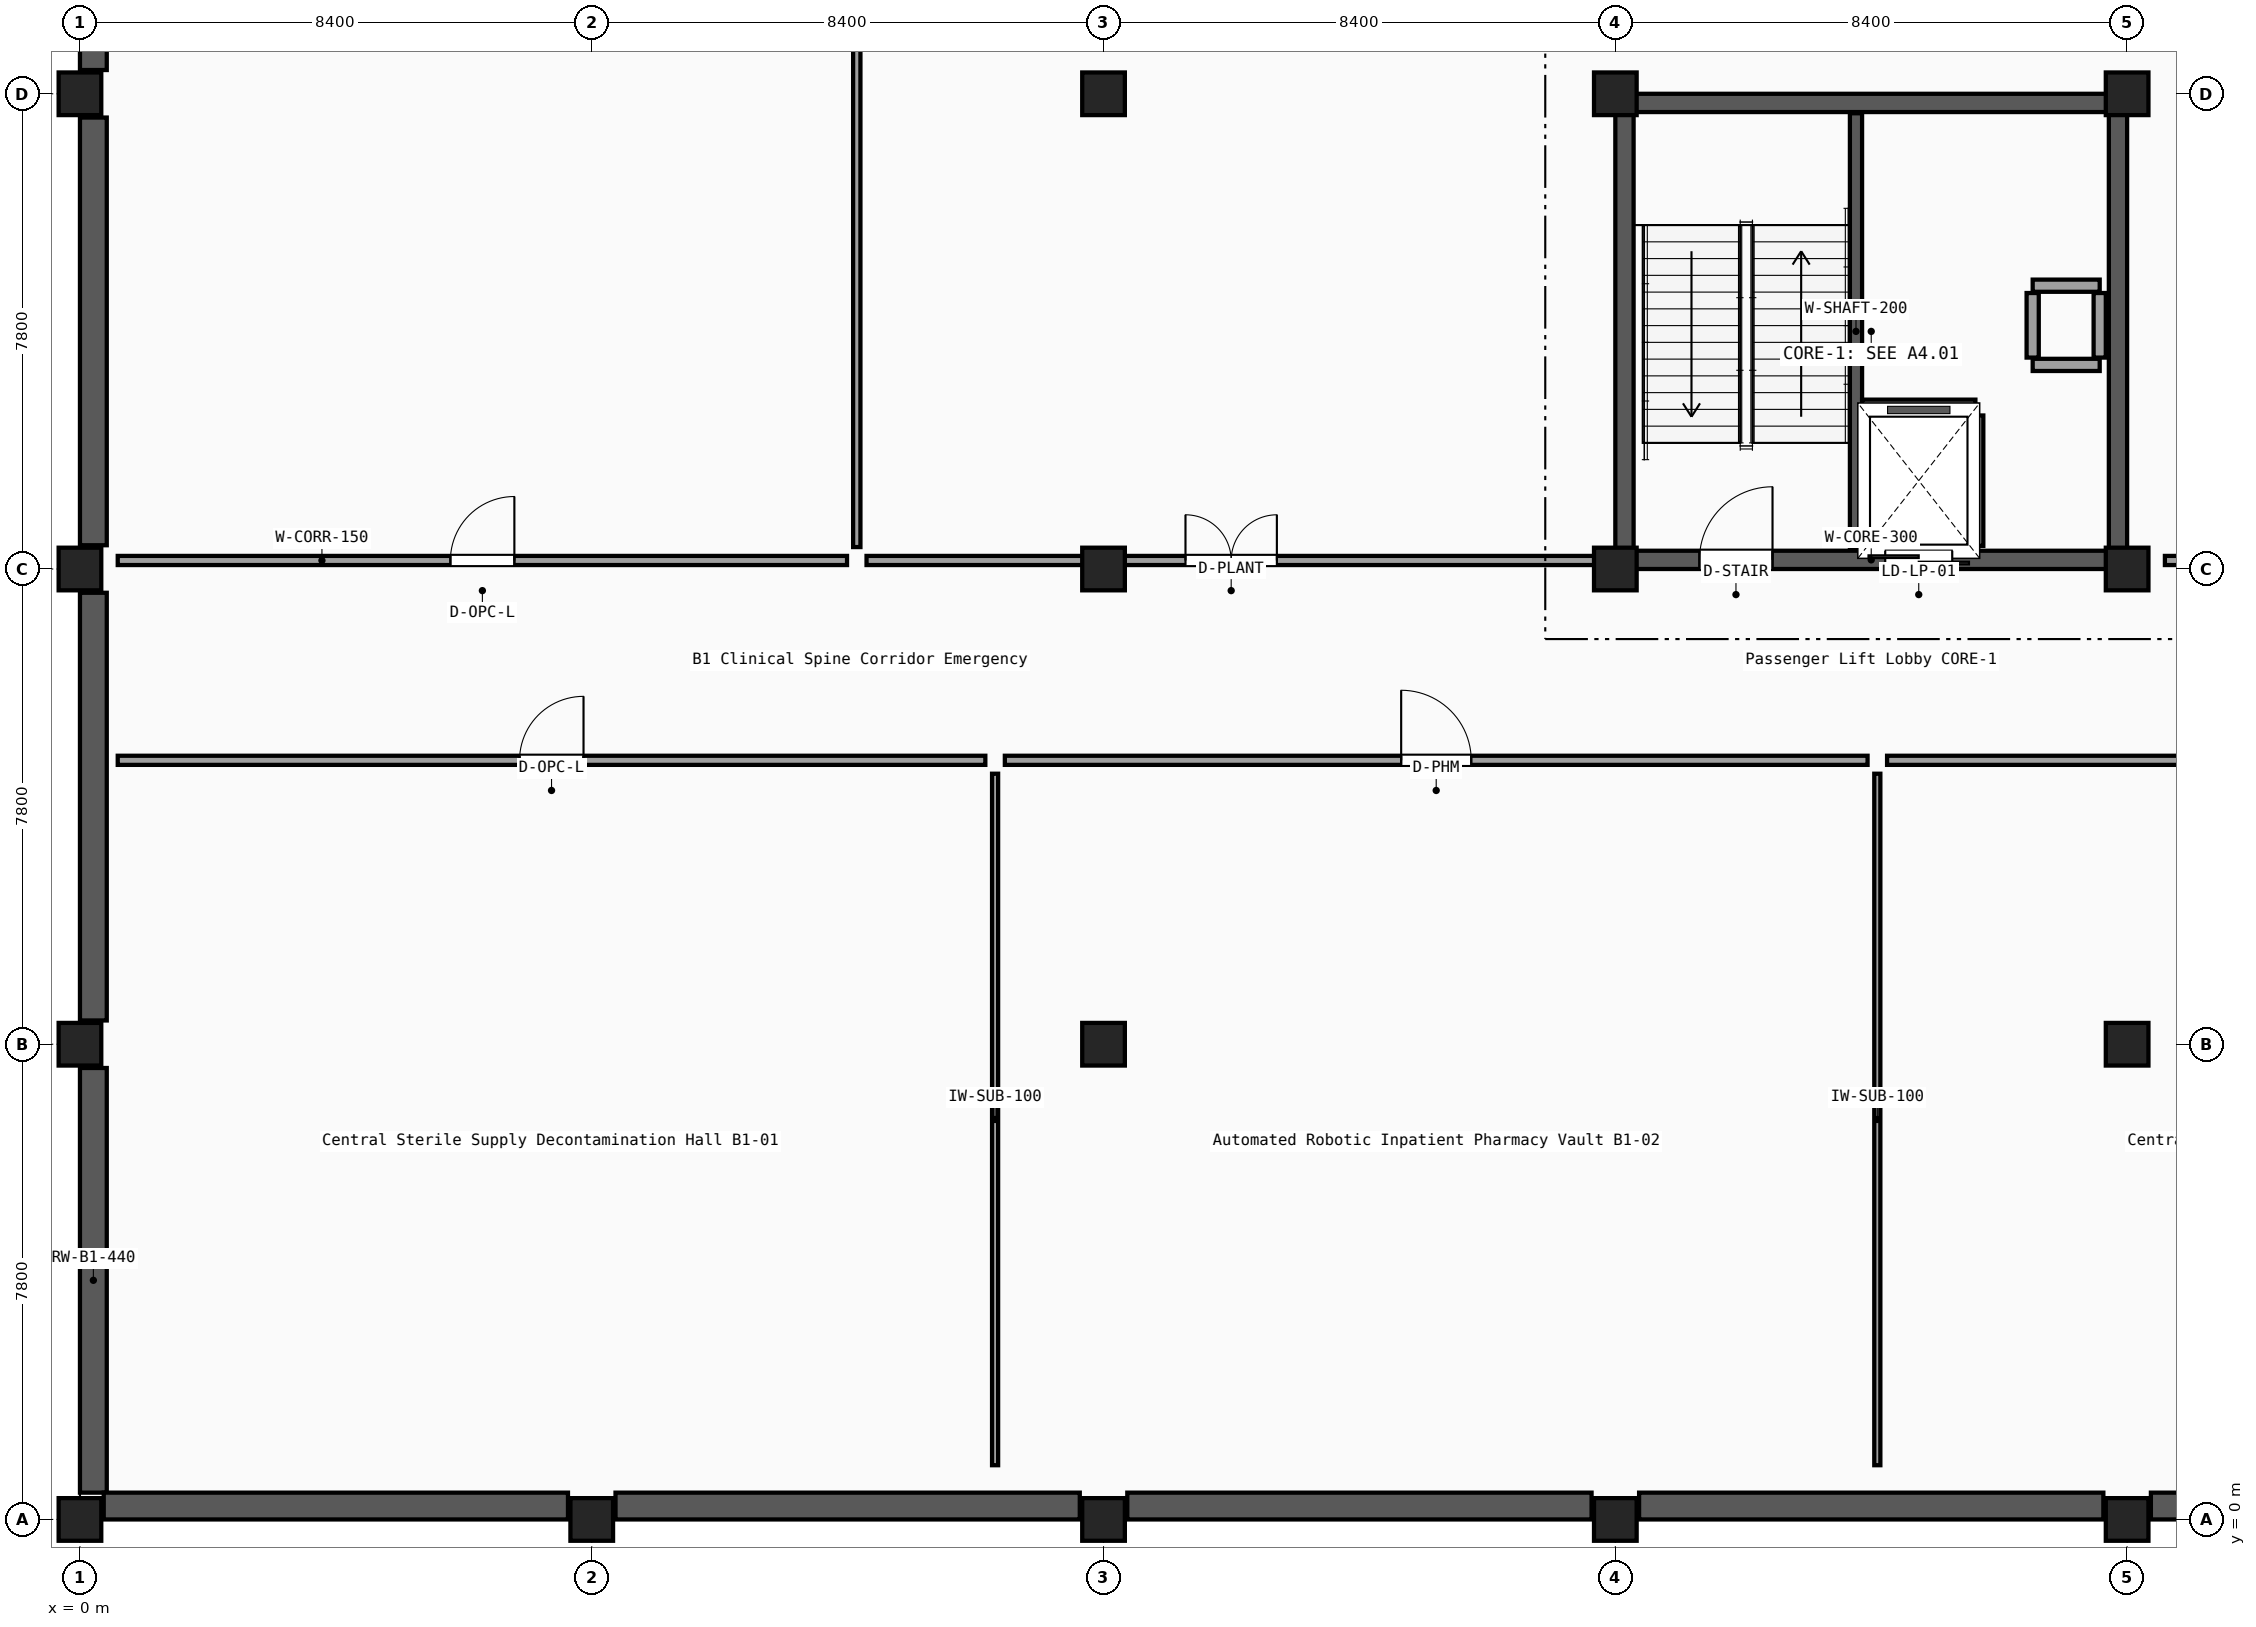
"""IFC4 building model, lengths in metres.
Left out: names, types, materials, properties, quantities, classifications, styles, units other than length and angle.
Written with IfcOpenShell. Run it as: python <this file> out.ifc"""

import sys

from ifc_helpers import new_model, si_unit, direction, frame, frame_2d, origin, origin_2d, place, context, subcontext, project, spatial, rectangle, extrude, element, fill, save


model = new_model("IFC4")
c1 = context("Model", 3, precision=1e-05, world=origin(), true_north=direction((0.0, 1.0)))
c2 = subcontext(c1, "Body", "Model", "MODEL_VIEW")
j1 = project(units=[si_unit("LENGTHUNIT", "METRE"), si_unit("PLANEANGLEUNIT", "RADIAN")], contexts=[c1])
p1 = place(None, origin())
s1 = spatial("IfcSite", under=j1, at=p1, CompositionType="ELEMENT")
p2 = place(p1, origin())
s2 = spatial("IfcBuilding", under=s1, at=p2, CompositionType="ELEMENT")
p3 = place(p2, frame((0.0, 0.0, -5.1)))
s3 = spatial("IfcBuildingStorey", under=s2, at=p3, CompositionType="ELEMENT", Elevation=-5.1)
for number, where, z_axis, x_axis in (
    (1, (0.0, 0.0, -0.22), (0.0, 0.0, 1.0), (1.0, 0.0, 0.0)),
    (2, (0.0, 7.8, -0.22), (0.0, 0.0, 1.0), (1.0, 0.0, 0.0)),
    (3, (0.0, 15.6, -0.22), (0.0, 0.0, 1.0), (1.0, 0.0, 0.0)),
    (4, (0.0, 23.4, -0.22), (0.0, 0.0, 1.0), (1.0, 0.0, 0.0)),
    (5, (8.4, 0.0, -0.22), (0.0, 0.0, 1.0), (1.0, 0.0, 0.0)),
    (6, (16.8, 0.0, -0.22), (0.0, 0.0, 1.0), (1.0, 0.0, 0.0)),
    (7, (16.8, 7.8, -0.22), (0.0, 0.0, 1.0), (1.0, 0.0, 0.0)),
    (8, (16.8, 15.6, -0.22), (0.0, 0.0, 1.0), (1.0, 0.0, 0.0)),
    (9, (16.8, 23.4, -0.22), (0.0, 0.0, 1.0), (1.0, 0.0, 0.0)),
    (10, (25.2, 0.0, -0.22), (0.0, 0.0, 1.0), (1.0, 0.0, 0.0)),
    (11, (25.2, 15.6, -0.22), (0.0, 0.0, 1.0), (1.0, 0.0, 0.0)),
    (12, (25.2, 23.4, -0.22), (0.0, 0.0, 1.0), (1.0, 0.0, 0.0)),
    (13, (33.6, 0.0, -0.22), (0.0, 0.0, 1.0), (1.0, 0.0, 0.0)),
    (14, (33.6, 7.8, -0.22), (0.0, 0.0, 1.0), (1.0, 0.0, 0.0)),
    (15, (33.6, 15.6, -0.22), (0.0, 0.0, 1.0), (1.0, 0.0, 0.0)),
    (16, (33.6, 23.4, -0.22), (0.0, 0.0, 1.0), (1.0, 0.0, 0.0)),
):
    element("IfcColumn", number, at=place(p3, frame(where, z_axis=z_axis, x_axis=x_axis)), inside=s3, PredefinedType="COLUMN", context=c2, shape_type="SweptSolid", body=[
        extrude(rectangle(XDim=0.7, YDim=0.7, at=origin_2d()), origin(), (0.0, 0.0, 1.0), 5.32),
    ])
p4 = place(p3, frame((0.22, 0.44, 0.0), z_axis=(0.0, 0.0, 1.0), x_axis=(0.0, 1.0, 0.0)))
e17 = element("IfcWall", 17, at=p4, inside=s3, PredefinedType="USERDEFINED", context=c2, shape_type="SweptSolid", body=[
    extrude(rectangle(XDim=6.97, YDim=0.44, at=frame_2d((3.485, 0.0))), origin(), (0.0, 0.0, 1.0), 4.33),
])
for number, where, z_axis, x_axis in (
    (18, (0.22, 8.19, 0.0), (0.0, 0.0, 1.0), (0.0, 1.0, 0.0)),
    (19, (0.22, 15.99, 0.0), (0.0, 0.0, 1.0), (0.0, 1.0, 0.0)),
):
    element("IfcWall", number, at=place(p3, frame(where, z_axis=z_axis, x_axis=x_axis)), inside=s3, PredefinedType="USERDEFINED", context=c2, shape_type="SweptSolid", body=[
        extrude(rectangle(XDim=7.02, YDim=0.44, at=frame_2d((3.51, 0.0))), origin(), (0.0, 0.0, 1.0), 4.23),
    ])
p5 = place(p3, frame((0.22, 23.79, 0.0), z_axis=(0.0, 0.0, 1.0), x_axis=(0.0, 1.0, 0.0)))
e20 = element("IfcWall", 20, at=p5, inside=s3, PredefinedType="USERDEFINED", context=c2, shape_type="SweptSolid", body=[
    extrude(rectangle(XDim=7.02, YDim=0.44, at=frame_2d((3.51, 0.0))), origin(), (0.0, 0.0, 1.0), 4.33),
])
p6 = place(p3, frame((0.39, 0.22, 0.0), z_axis=(0.0, 0.0, 1.0), x_axis=(1.0, 0.0, 0.0)))
e21 = element("IfcWall", 21, at=p6, inside=s3, PredefinedType="USERDEFINED", context=c2, shape_type="SweptSolid", body=[
    extrude(rectangle(XDim=7.62, YDim=0.44, at=frame_2d((3.81, 0.0))), origin(), (0.0, 0.0, 1.0), 4.44),
])
p7 = place(p3, frame((8.79, 0.22, 0.0), z_axis=(0.0, 0.0, 1.0), x_axis=(1.0, 0.0, 0.0)))
e22 = element("IfcWall", 22, at=p7, inside=s3, PredefinedType="USERDEFINED", context=c2, shape_type="SweptSolid", body=[
    extrude(rectangle(XDim=7.62, YDim=0.44, at=frame_2d((3.81, 0.0))), origin(), (0.0, 0.0, 1.0), 4.43),
])
p8 = place(p3, frame((17.19, 0.22, 0.0), z_axis=(0.0, 0.0, 1.0), x_axis=(1.0, 0.0, 0.0)))
e23 = element("IfcWall", 23, at=p8, inside=s3, PredefinedType="USERDEFINED", context=c2, shape_type="SweptSolid", body=[
    extrude(rectangle(XDim=7.62, YDim=0.44, at=frame_2d((3.81, 0.0))), origin(), (0.0, 0.0, 1.0), 4.43),
])
p9 = place(p3, frame((25.59, 0.22, 0.0), z_axis=(0.0, 0.0, 1.0), x_axis=(1.0, 0.0, 0.0)))
e24 = element("IfcWall", 24, at=p9, inside=s3, PredefinedType="USERDEFINED", context=c2, shape_type="SweptSolid", body=[
    extrude(rectangle(XDim=7.62, YDim=0.44, at=frame_2d((3.81, 0.0))), origin(), (0.0, 0.0, 1.0), 4.43),
])
p10 = place(p3, frame((33.99, 0.22, 0.0), z_axis=(0.0, 0.0, 1.0), x_axis=(1.0, 0.0, 0.0)))
e25 = element("IfcWall", 25, at=p10, inside=s3, PredefinedType="USERDEFINED", context=c2, shape_type="SweptSolid", body=[
    extrude(rectangle(XDim=7.62, YDim=0.44, at=frame_2d((3.81, 0.0))), origin(), (0.0, 0.0, 1.0), 4.43),
])
p11 = place(p3, frame((25.2, 15.75, -0.22), z_axis=(0.0, 0.0, 1.0), x_axis=(1.0, 0.0, 0.0)))
e26 = element("IfcWall", 26, at=p11, inside=s3, PredefinedType="SHEAR", context=c2, shape_type="SweptSolid", body=[
    extrude(rectangle(XDim=8.4, YDim=0.3, at=frame_2d((4.2, 0.0))), origin(), (0.0, 0.0, 1.0), 5.07),
])
p12 = place(p11, frame((1.38, 0.0, 0.22)))
e27 = element("IfcOpeningElement", 27, at=p12, cuts=e26, PredefinedType="OPENING", context=c2, shape_type="SweptSolid", body=[
    extrude(rectangle(XDim=1.2, YDim=2.15, at=frame_2d((0.6, 1.075))), frame((0.0, 0.16, 0.0), z_axis=(0.0, -1.0, 0.0), x_axis=(1.0, 0.0, 0.0)), (0.0, 0.0, 1.0), 0.32),
])
p13 = place(p11, frame((4.43, 0.0, 0.22)))
e28 = element("IfcOpeningElement", 28, at=p13, cuts=e26, PredefinedType="OPENING", context=c2, shape_type="SweptSolid", body=[
    extrude(rectangle(XDim=1.1, YDim=2.15, at=frame_2d((0.55, 1.075))), frame((0.0, 0.16, 0.0), z_axis=(0.0, -1.0, 0.0), x_axis=(1.0, 0.0, 0.0)), (0.0, 0.0, 1.0), 0.32),
])
p14 = place(p3, frame((25.2, 23.25, -0.22), z_axis=(0.0, 0.0, 1.0), x_axis=(1.0, 0.0, 0.0)))
e29 = element("IfcWall", 29, at=p14, inside=s3, PredefinedType="SHEAR", context=c2, shape_type="SweptSolid", body=[
    extrude(rectangle(XDim=8.4, YDim=0.3, at=frame_2d((4.2, 0.0))), origin(), (0.0, 0.0, 1.0), 5.07),
])
for number, where, z_axis, x_axis in (
    (30, (25.35, 15.9, -0.22), (0.0, 0.0, 1.0), (0.0, 1.0, 0.0)),
    (31, (33.45, 15.9, -0.22), (0.0, 0.0, 1.0), (0.0, 1.0, 0.0)),
):
    element("IfcWall", number, at=place(p3, frame(where, z_axis=z_axis, x_axis=x_axis)), inside=s3, PredefinedType="SHEAR", context=c2, shape_type="SweptSolid", body=[
        extrude(rectangle(XDim=7.2, YDim=0.3, at=frame_2d((3.6, 0.0))), origin(), (0.0, 0.0, 1.0), 5.07),
    ])
p15 = place(p3, frame((29.15, 15.92, -0.22), z_axis=(0.0, 0.0, 1.0), x_axis=(0.0, 1.0, 0.0)))
e32 = element("IfcWall", 32, at=p15, inside=s3, PredefinedType="SHEAR", context=c2, shape_type="SweptSolid", body=[
    extrude(rectangle(XDim=7.16, YDim=0.2, at=frame_2d((3.58, 0.0))), origin(), (0.0, 0.0, 1.0), 5.07),
])
for number, where, z_axis, x_axis in (
    (33, (32.05, 18.95, 0.0), (0.0, 0.0, 1.0), (1.0, 0.0, 0.0)),
    (34, (32.05, 20.25, 0.0), (0.0, 0.0, 1.0), (1.0, 0.0, 0.0)),
):
    element("IfcWall", number, at=place(p3, frame(where, z_axis=z_axis, x_axis=x_axis)), inside=s3, PredefinedType="PARTITIONING", context=c2, shape_type="SweptSolid", body=[
        extrude(rectangle(XDim=1.1, YDim=0.2, at=frame_2d((0.55, 0.0))), origin(), (0.0, 0.0, 1.0), 4.33),
    ])
for number, where, z_axis, x_axis in (
    (35, (32.05, 19.07, 0.0), (0.0, 0.0, 1.0), (0.0, 1.0, 0.0)),
    (36, (33.15, 19.07, 0.0), (0.0, 0.0, 1.0), (0.0, 1.0, 0.0)),
):
    element("IfcWall", number, at=place(p3, frame(where, z_axis=z_axis, x_axis=x_axis)), inside=s3, PredefinedType="PARTITIONING", context=c2, shape_type="SweptSolid", body=[
        extrude(rectangle(XDim=1.06, YDim=0.2, at=frame_2d((0.53, 0.0))), origin(), (0.0, 0.0, 1.0), 4.33),
    ])
p16 = place(p3, frame((31.14, 15.98, 0.0), z_axis=(0.0, 0.0, 1.0), x_axis=(0.0, 1.0, 0.0)))
e37 = element("IfcWall", 37, at=p16, inside=s3, PredefinedType="PARTITIONING", context=c2, shape_type="SweptSolid", body=[
    extrude(rectangle(XDim=2.14, YDim=0.2, at=frame_2d((1.07, 0.0))), origin(), (0.0, 0.0, 1.0), 4.33),
])
p17 = place(p3, frame((29.25, 18.28, 0.0), z_axis=(0.0, 0.0, 1.0), x_axis=(1.0, 0.0, 0.0)))
e38 = element("IfcWall", 38, at=p17, inside=s3, PredefinedType="PARTITIONING", context=c2, shape_type="SweptSolid", body=[
    extrude(rectangle(XDim=1.86, YDim=0.2, at=frame_2d((0.93, 0.0))), origin(), (0.0, 0.0, 1.0), 4.33),
])
p18 = place(p3, frame((0.62, 12.46, 0.0), z_axis=(0.0, 0.0, 1.0), x_axis=(1.0, 0.0, 0.0)))
e39 = element("IfcWall", 39, at=p18, inside=s3, PredefinedType="PARTITIONING", context=c2, shape_type="SweptSolid", body=[
    extrude(rectangle(XDim=14.24, YDim=0.15, at=frame_2d((7.12, 0.0))), origin(), (0.0, 0.0, 1.0), 4.82),
])
p19 = place(p18, frame((6.595, 0.0, 0.0)))
e40 = element("IfcOpeningElement", 40, at=p19, cuts=e39, PredefinedType="OPENING", context=c2, shape_type="SweptSolid", body=[
    extrude(rectangle(XDim=1.05, YDim=2.15, at=frame_2d((0.525, 1.075))), frame((0.0, 0.085, 0.0), z_axis=(0.0, -1.0, 0.0), x_axis=(1.0, 0.0, 0.0)), (0.0, 0.0, 1.0), 0.17),
])
p20 = place(p3, frame((15.02, 0.89, 0.0), z_axis=(0.0, 0.0, 1.0), x_axis=(0.0, 1.0, 0.0)))
e41 = element("IfcWall", 41, at=p20, inside=s3, PredefinedType="PARTITIONING", context=c2, shape_type="SweptSolid", body=[
    extrude(rectangle(XDim=11.35, YDim=0.1, at=frame_2d((5.675, 0.0))), origin(), (0.0, 0.0, 1.0), 4.33),
])
p21 = place(p3, frame((15.18, 12.46, 0.0), z_axis=(0.0, 0.0, 1.0), x_axis=(1.0, 0.0, 0.0)))
e42 = element("IfcWall", 42, at=p21, inside=s3, PredefinedType="PARTITIONING", context=c2, shape_type="SweptSolid", body=[
    extrude(rectangle(XDim=14.16, YDim=0.15, at=frame_2d((7.08, 0.0))), origin(), (0.0, 0.0, 1.0), 4.43),
])
p22 = place(p21, frame((6.505, 0.0, 0.0)))
e43 = element("IfcOpeningElement", 43, at=p22, cuts=e42, PredefinedType="OPENING", context=c2, shape_type="SweptSolid", body=[
    extrude(rectangle(XDim=1.15, YDim=2.15, at=frame_2d((0.575, 1.075))), frame((0.0, 0.085, 0.0), z_axis=(0.0, -1.0, 0.0), x_axis=(1.0, 0.0, 0.0)), (0.0, 0.0, 1.0), 0.17),
])
p23 = place(p3, frame((29.5, 0.89, 0.0), z_axis=(0.0, 0.0, 1.0), x_axis=(0.0, 1.0, 0.0)))
e44 = element("IfcWall", 44, at=p23, inside=s3, PredefinedType="PARTITIONING", context=c2, shape_type="SweptSolid", body=[
    extrude(rectangle(XDim=11.35, YDim=0.1, at=frame_2d((5.675, 0.0))), origin(), (0.0, 0.0, 1.0), 4.33),
])
p24 = place(p3, frame((29.66, 12.46, 0.0), z_axis=(0.0, 0.0, 1.0), x_axis=(1.0, 0.0, 0.0)))
e45 = element("IfcWall", 45, at=p24, inside=s3, PredefinedType="PARTITIONING", context=c2, shape_type="SweptSolid", body=[
    extrude(rectangle(XDim=14.16, YDim=0.15, at=frame_2d((7.08, 0.0))), origin(), (0.0, 0.0, 1.0), 4.43),
])
p25 = place(p24, frame((6.555, 0.0, 0.0)))
e46 = element("IfcOpeningElement", 46, at=p25, cuts=e45, PredefinedType="OPENING", context=c2, shape_type="SweptSolid", body=[
    extrude(rectangle(XDim=1.05, YDim=2.15, at=frame_2d((0.525, 1.075))), frame((0.0, 0.085, 0.0), z_axis=(0.0, -1.0, 0.0), x_axis=(1.0, 0.0, 0.0)), (0.0, 0.0, 1.0), 0.17),
])
p26 = place(p3, frame((0.62, 15.74, 0.0), z_axis=(0.0, 0.0, 1.0), x_axis=(1.0, 0.0, 0.0)))
e47 = element("IfcWall", 47, at=p26, inside=s3, PredefinedType="PARTITIONING", context=c2, shape_type="SweptSolid", body=[
    extrude(rectangle(XDim=11.97, YDim=0.15, at=frame_2d((5.985, 0.0))), origin(), (0.0, 0.0, 1.0), 4.23),
])
p27 = place(p26, frame((5.46, 0.0, 0.0)))
e48 = element("IfcOpeningElement", 48, at=p27, cuts=e47, PredefinedType="OPENING", context=c2, shape_type="SweptSolid", body=[
    extrude(rectangle(XDim=1.05, YDim=2.15, at=frame_2d((0.525, 1.075))), frame((0.0, 0.085, 0.0), z_axis=(0.0, -1.0, 0.0), x_axis=(1.0, 0.0, 0.0)), (0.0, 0.0, 1.0), 0.17),
])
p28 = place(p3, frame((12.75, 15.96, 0.0), z_axis=(0.0, 0.0, 1.0), x_axis=(0.0, 1.0, 0.0)))
e49 = element("IfcWall", 49, at=p28, inside=s3, PredefinedType="PARTITIONING", context=c2, shape_type="SweptSolid", body=[
    extrude(rectangle(XDim=22.35, YDim=0.12, at=frame_2d((11.175, 0.0))), origin(), (0.0, 0.0, 1.0), 4.33),
])
p29 = place(p3, frame((12.91, 15.74, 0.0), z_axis=(0.0, 0.0, 1.0), x_axis=(1.0, 0.0, 0.0)))
e50 = element("IfcWall", 50, at=p29, inside=s3, PredefinedType="PARTITIONING", context=c2, shape_type="SweptSolid", body=[
    extrude(rectangle(XDim=11.97, YDim=0.15, at=frame_2d((5.985, 0.0))), origin(), (0.0, 0.0, 1.0), 4.23),
])
p30 = place(p29, frame((5.235, 0.0, 0.0)))
e51 = element("IfcOpeningElement", 51, at=p30, cuts=e50, PredefinedType="OPENING", context=c2, shape_type="SweptSolid", body=[
    extrude(rectangle(XDim=1.5, YDim=2.25, at=frame_2d((0.75, 1.125))), frame((0.0, 0.085, 0.0), z_axis=(0.0, -1.0, 0.0), x_axis=(1.0, 0.0, 0.0)), (0.0, 0.0, 1.0), 0.17),
])
p31 = place(p3, frame((34.22, 15.74, 0.0), z_axis=(0.0, 0.0, 1.0), x_axis=(1.0, 0.0, 0.0)))
e52 = element("IfcWall", 52, at=p31, inside=s3, PredefinedType="PARTITIONING", context=c2, shape_type="SweptSolid", body=[
    extrude(rectangle(XDim=11.92, YDim=0.15, at=frame_2d((5.96, 0.0))), origin(), (0.0, 0.0, 1.0), 4.82),
])
p32 = place(p31, frame((5.435, 0.0, 0.0)))
e53 = element("IfcOpeningElement", 53, at=p32, cuts=e52, PredefinedType="OPENING", context=c2, shape_type="SweptSolid", body=[
    extrude(rectangle(XDim=1.05, YDim=2.15, at=frame_2d((0.525, 1.075))), frame((0.0, 0.085, 0.0), z_axis=(0.0, -1.0, 0.0), x_axis=(1.0, 0.0, 0.0)), (0.0, 0.0, 1.0), 0.17),
])
p33 = place(p12, origin())
e54 = element("IfcDoor", 54, at=p33, inside=s3, OperationType="SINGLE_SWING_RIGHT", PredefinedType="DOOR", context=c2, shape_type="SweptSolid", body=[
    extrude(rectangle(XDim=1.2, YDim=2.15, at=frame_2d((0.6, 1.075))), frame((0.0, 0.025, 0.0), z_axis=(0.0, -1.0, 0.0), x_axis=(1.0, 0.0, 0.0)), (0.0, 0.0, 1.0), 0.05),
])
fill(e27, e54)
p34 = place(p13, origin())
e55 = element("IfcDoor", 55, at=p34, inside=s3, OperationType="DOUBLE_DOOR_SLIDING", PredefinedType="DOOR", context=c2, shape_type="SweptSolid", body=[
    extrude(rectangle(XDim=1.1, YDim=2.15, at=frame_2d((0.55, 1.075))), frame((0.0, 0.025, 0.0), z_axis=(0.0, -1.0, 0.0), x_axis=(1.0, 0.0, 0.0)), (0.0, 0.0, 1.0), 0.05),
])
fill(e28, e55)
p35 = place(p19, origin())
e56 = element("IfcDoor", 56, at=p35, inside=s3, OperationType="SINGLE_SWING_RIGHT", PredefinedType="DOOR", context=c2, shape_type="SweptSolid", body=[
    extrude(rectangle(XDim=1.05, YDim=2.15, at=frame_2d((0.525, 1.075))), frame((0.0, 0.025, 0.0), z_axis=(0.0, -1.0, 0.0), x_axis=(1.0, 0.0, 0.0)), (0.0, 0.0, 1.0), 0.05),
])
fill(e40, e56)
p36 = place(p22, origin())
e57 = element("IfcDoor", 57, at=p36, inside=s3, OperationType="SINGLE_SWING_LEFT", PredefinedType="DOOR", context=c2, shape_type="SweptSolid", body=[
    extrude(rectangle(XDim=1.15, YDim=2.15, at=frame_2d((0.575, 1.075))), frame((0.0, 0.025, 0.0), z_axis=(0.0, -1.0, 0.0), x_axis=(1.0, 0.0, 0.0)), (0.0, 0.0, 1.0), 0.05),
])
fill(e43, e57)
p37 = place(p27, origin())
e58 = element("IfcDoor", 58, at=p37, inside=s3, OperationType="SINGLE_SWING_RIGHT", PredefinedType="DOOR", context=c2, shape_type="SweptSolid", body=[
    extrude(rectangle(XDim=1.05, YDim=2.15, at=frame_2d((0.525, 1.075))), frame((0.0, 0.025, 0.0), z_axis=(0.0, -1.0, 0.0), x_axis=(1.0, 0.0, 0.0)), (0.0, 0.0, 1.0), 0.05),
])
fill(e48, e58)
p38 = place(p30, origin())
e59 = element("IfcDoor", 59, at=p38, inside=s3, OperationType="DOUBLE_DOOR_SINGLE_SWING", PredefinedType="DOOR", context=c2, shape_type="SweptSolid", body=[
    extrude(rectangle(XDim=1.5, YDim=2.25, at=frame_2d((0.75, 1.125))), frame((0.0, 0.025, 0.0), z_axis=(0.0, -1.0, 0.0), x_axis=(1.0, 0.0, 0.0)), (0.0, 0.0, 1.0), 0.05),
])
fill(e51, e59)
save(model, sys.argv[1])
